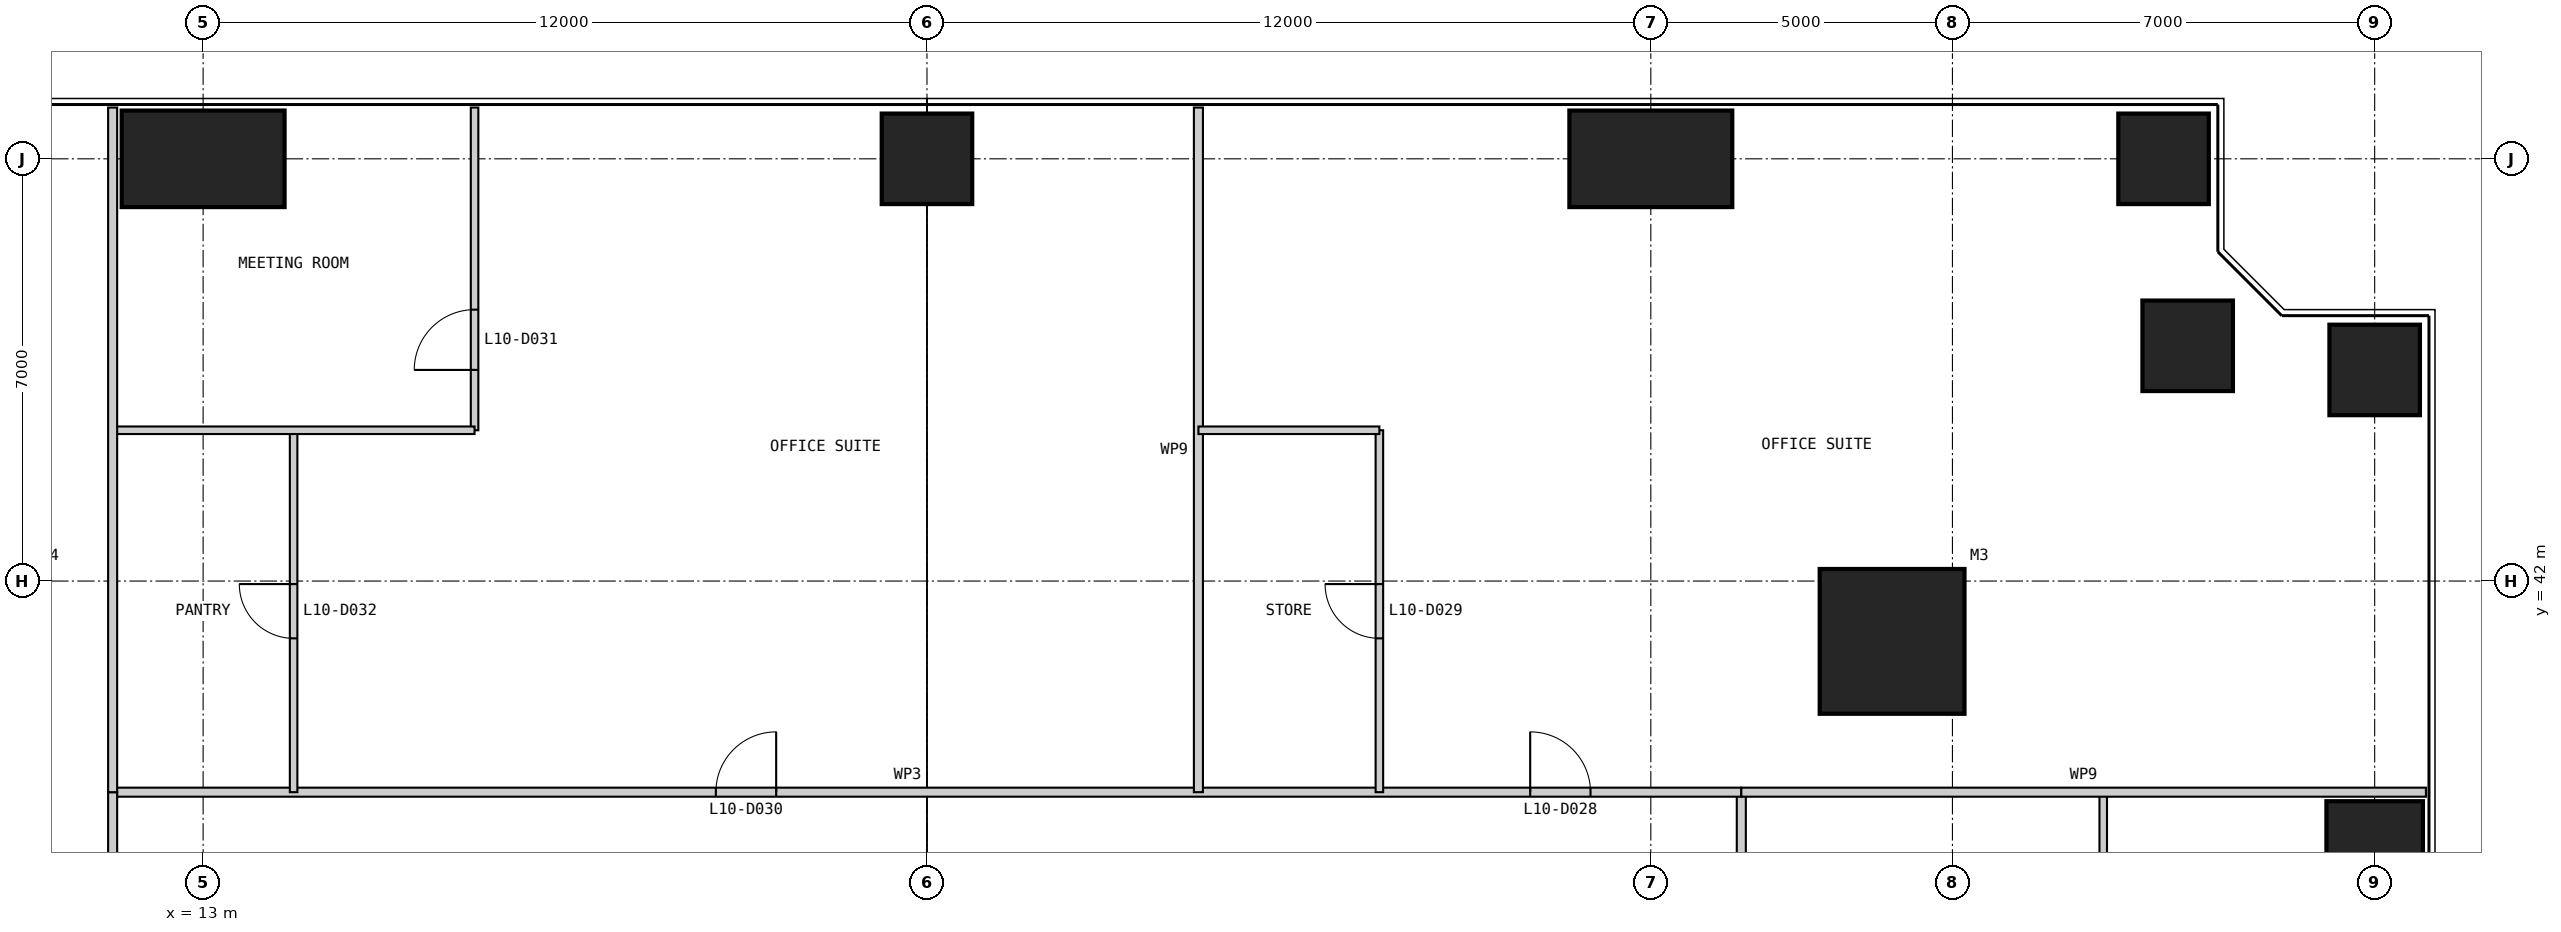
"""IFC4 building model, lengths in metres.
Left out: names, types, materials, properties, quantities, classifications, styles, units other than length and angle.
Written with IfcOpenShell. Run it as: python <this file> out.ifc"""

import sys

from ifc_helpers import new_model, si_unit, direction, frame, frame_2d, origin, origin_2d, place, context, subcontext, project, spatial, rectangle, extrude, element, fill, save


model = new_model("IFC4")
c1 = context("Model", 3, precision=1e-05, world=origin(), true_north=direction((0.0, 1.0)))
c2 = subcontext(c1, "Body", "Model", "MODEL_VIEW")
j1 = project(units=[si_unit("LENGTHUNIT", "METRE"), si_unit("PLANEANGLEUNIT", "RADIAN")], contexts=[c1])
p1 = place(None, origin())
s1 = spatial("IfcSite", under=j1, at=p1, CompositionType="ELEMENT")
p2 = place(p1, origin())
s2 = spatial("IfcBuilding", under=s1, at=p2, CompositionType="ELEMENT")
p3 = place(p2, frame((0.0, 0.0, 47.0)))
s3 = spatial("IfcBuildingStorey", under=s2, at=p3, CompositionType="ELEMENT", Elevation=47.0)
p4 = place(p3, frame((41.0, 41.0, 0.0), z_axis=(0.0, 0.0, 1.0), x_axis=(1.0, 0.0, 0.0)))
e1 = element("IfcColumn", 1, at=p4, inside=s3, PredefinedType="COLUMN", context=c2, shape_type="SweptSolid", body=[
    extrude(rectangle(XDim=2.4, YDim=2.4, at=origin_2d()), origin(), (0.0, 0.0, 1.0), 4.0),
])
p5 = place(p3, frame((49.0, 37.0, 0.0), z_axis=(0.0, 0.0, 1.0), x_axis=(1.0, 0.0, 0.0)))
e2 = element("IfcColumn", 2, at=p5, inside=s3, PredefinedType="COLUMN", context=c2, shape_type="SweptSolid", body=[
    extrude(rectangle(XDim=1.6, YDim=2.7, at=origin_2d()), origin(), (0.0, 0.0, 1.0), 4.0),
])
for number, where, z_axis, x_axis in (
    (3, (49.0, 45.5, 0.0), (0.0, 0.0, 1.0), (1.0, 0.0, 0.0)),
    (4, (45.9, 45.9, 0.0), (0.0, 0.0, 1.0), (1.0, 0.0, 0.0)),
    (5, (45.5, 49.0, 0.0), (0.0, 0.0, 1.0), (1.0, 0.0, 0.0)),
):
    element("IfcColumn", number, at=place(p3, frame(where, z_axis=z_axis, x_axis=x_axis)), inside=s3, PredefinedType="COLUMN", context=c2, shape_type="SweptSolid", body=[
        extrude(rectangle(XDim=1.5, YDim=1.5, at=origin_2d()), origin(), (0.0, 0.0, 1.0), 4.0),
    ])
p6 = place(p3, frame((37.0, 49.0, 0.0), z_axis=(0.0, 0.0, 1.0), x_axis=(1.0, 0.0, 0.0)))
e6 = element("IfcColumn", 6, at=p6, inside=s3, PredefinedType="COLUMN", context=c2, shape_type="SweptSolid", body=[
    extrude(rectangle(XDim=2.7, YDim=1.6, at=origin_2d()), origin(), (0.0, 0.0, 1.0), 4.0),
])
p7 = place(p3, frame((25.0, 49.0, 0.0), z_axis=(0.0, 0.0, 1.0), x_axis=(1.0, 0.0, 0.0)))
e7 = element("IfcColumn", 7, at=p7, inside=s3, PredefinedType="COLUMN", context=c2, shape_type="SweptSolid", body=[
    extrude(rectangle(XDim=1.5, YDim=1.5, at=origin_2d()), origin(), (0.0, 0.0, 1.0), 4.0),
])
p8 = place(p3, frame((13.0, 49.0, 0.0), z_axis=(0.0, 0.0, 1.0), x_axis=(1.0, 0.0, 0.0)))
e8 = element("IfcColumn", 8, at=p8, inside=s3, PredefinedType="COLUMN", context=c2, shape_type="SweptSolid", body=[
    extrude(rectangle(XDim=2.7, YDim=1.6, at=origin_2d()), origin(), (0.0, 0.0, 1.0), 4.0),
])
p9 = place(p3, frame((38.5, 11.5, 0.0), z_axis=(0.0, 0.0, 1.0), x_axis=(0.0, 1.0, 0.0)))
e9 = element("IfcWall", 9, at=p9, inside=s3, PredefinedType="PARTITIONING", context=c2, shape_type="SweptSolid", body=[
    extrude(rectangle(XDim=27.0, YDim=0.15, at=frame_2d((13.5, 0.0))), origin(), (0.0, 0.0, 1.0), 3.85),
])
p10 = place(p9, frame((2.5, 0.0, 0.0)))
e10 = element("IfcOpeningElement", 10, at=p10, cuts=e9, PredefinedType="OPENING", context=c2, shape_type="SweptSolid", body=[
    extrude(rectangle(XDim=1.0, YDim=2.2, at=frame_2d((0.5, 1.1))), frame((0.0, 0.085, 0.0), z_axis=(0.0, -1.0, 0.0), x_axis=(1.0, 0.0, 0.0)), (0.0, 0.0, 1.0), 0.17),
])
p11 = place(p9, frame((16.0, 0.0, 0.0)))
e11 = element("IfcOpeningElement", 11, at=p11, cuts=e9, PredefinedType="OPENING", context=c2, shape_type="SweptSolid", body=[
    extrude(rectangle(XDim=1.0, YDim=2.2, at=frame_2d((0.5, 1.1))), frame((0.0, 0.085, 0.0), z_axis=(0.0, -1.0, 0.0), x_axis=(1.0, 0.0, 0.0)), (0.0, 0.0, 1.0), 0.17),
])
p12 = place(p3, frame((44.5, 32.5, 0.0), z_axis=(0.0, 0.0, 1.0), x_axis=(0.0, 1.0, 0.0)))
e12 = element("IfcWall", 12, at=p12, inside=s3, PredefinedType="PARTITIONING", context=c2, shape_type="SweptSolid", body=[
    extrude(rectangle(XDim=6.0, YDim=0.125, at=frame_2d((3.0, 0.0))), origin(), (0.0, 0.0, 1.0), 3.85),
])
p13 = place(p3, frame((38.5, 38.5, 0.0), z_axis=(0.0, 0.0, 1.0), x_axis=(-1.0, 0.0, 0.0)))
e13 = element("IfcWall", 13, at=p13, inside=s3, PredefinedType="PARTITIONING", context=c2, shape_type="SweptSolid", body=[
    extrude(rectangle(XDim=27.0, YDim=0.15, at=frame_2d((13.5, 0.0))), origin(), (0.0, 0.0, 1.0), 3.85),
])
p14 = place(p13, frame((2.5, 0.0, 0.0)))
e14 = element("IfcOpeningElement", 14, at=p14, cuts=e13, PredefinedType="OPENING", context=c2, shape_type="SweptSolid", body=[
    extrude(rectangle(XDim=1.0, YDim=2.2, at=frame_2d((0.5, 1.1))), frame((0.0, 0.085, 0.0), z_axis=(0.0, -1.0, 0.0), x_axis=(1.0, 0.0, 0.0)), (0.0, 0.0, 1.0), 0.17),
])
p15 = place(p13, frame((16.0, 0.0, 0.0)))
e15 = element("IfcOpeningElement", 15, at=p15, cuts=e13, PredefinedType="OPENING", context=c2, shape_type="SweptSolid", body=[
    extrude(rectangle(XDim=1.0, YDim=2.2, at=frame_2d((0.5, 1.1))), frame((0.0, 0.085, 0.0), z_axis=(0.0, -1.0, 0.0), x_axis=(1.0, 0.0, 0.0)), (0.0, 0.0, 1.0), 0.17),
])
p16 = place(p3, frame((49.85, 38.5, 0.0), z_axis=(0.0, 0.0, 1.0), x_axis=(-1.0, 0.0, 0.0)))
e16 = element("IfcWall", 16, at=p16, inside=s3, PredefinedType="PARTITIONING", context=c2, shape_type="SweptSolid", body=[
    extrude(rectangle(XDim=11.35, YDim=0.15, at=frame_2d((5.675, 0.0))), origin(), (0.0, 0.0, 1.0), 3.85),
])
p17 = place(p3, frame((32.5, 44.5, 0.0), z_axis=(0.0, 0.0, 1.0), x_axis=(0.0, -1.0, 0.0)))
e17 = element("IfcWall", 17, at=p17, inside=s3, PredefinedType="PARTITIONING", context=c2, shape_type="SweptSolid", body=[
    extrude(rectangle(XDim=6.0, YDim=0.125, at=frame_2d((3.0, 0.0))), origin(), (0.0, 0.0, 1.0), 3.85),
])
p18 = place(p17, frame((2.55, 0.0, 0.0)))
e18 = element("IfcOpeningElement", 18, at=p18, cuts=e17, PredefinedType="OPENING", context=c2, shape_type="SweptSolid", body=[
    extrude(rectangle(XDim=0.9, YDim=2.2, at=frame_2d((0.45, 1.1))), frame((0.0, 0.073, 0.0), z_axis=(0.0, -1.0, 0.0), x_axis=(1.0, 0.0, 0.0)), (0.0, 0.0, 1.0), 0.145),
])
p19 = place(p3, frame((29.5, 49.85, 0.0), z_axis=(0.0, 0.0, 1.0), x_axis=(0.0, -1.0, 0.0)))
e19 = element("IfcWall", 19, at=p19, inside=s3, PredefinedType="PARTITIONING", context=c2, shape_type="SweptSolid", body=[
    extrude(rectangle(XDim=11.35, YDim=0.15, at=frame_2d((5.675, 0.0))), origin(), (0.0, 0.0, 1.0), 3.85),
])
p20 = place(p3, frame((17.5, 49.85, 0.0), z_axis=(0.0, 0.0, 1.0), x_axis=(0.0, -1.0, 0.0)))
e20 = element("IfcWall", 20, at=p20, inside=s3, PredefinedType="PARTITIONING", context=c2, shape_type="SweptSolid", body=[
    extrude(rectangle(XDim=5.35, YDim=0.125, at=frame_2d((2.675, 0.0))), origin(), (0.0, 0.0, 1.0), 3.85),
])
p21 = place(p20, frame((3.35, 0.0, 0.0)))
e21 = element("IfcOpeningElement", 21, at=p21, cuts=e20, PredefinedType="OPENING", context=c2, shape_type="SweptSolid", body=[
    extrude(rectangle(XDim=1.0, YDim=2.2, at=frame_2d((0.5, 1.1))), frame((0.0, 0.073, 0.0), z_axis=(0.0, -1.0, 0.0), x_axis=(1.0, 0.0, 0.0)), (0.0, 0.0, 1.0), 0.145),
])
p22 = place(p3, frame((14.5, 44.5, 0.0), z_axis=(0.0, 0.0, 1.0), x_axis=(0.0, -1.0, 0.0)))
e22 = element("IfcWall", 22, at=p22, inside=s3, PredefinedType="PARTITIONING", context=c2, shape_type="SweptSolid", body=[
    extrude(rectangle(XDim=6.0, YDim=0.125, at=frame_2d((3.0, 0.0))), origin(), (0.0, 0.0, 1.0), 3.85),
])
p23 = place(p22, frame((2.55, 0.0, 0.0)))
e23 = element("IfcOpeningElement", 23, at=p23, cuts=e22, PredefinedType="OPENING", context=c2, shape_type="SweptSolid", body=[
    extrude(rectangle(XDim=0.9, YDim=2.2, at=frame_2d((0.45, 1.1))), frame((0.0, 0.073, 0.0), z_axis=(0.0, -1.0, 0.0), x_axis=(1.0, 0.0, 0.0)), (0.0, 0.0, 1.0), 0.145),
])
p24 = place(p3, frame((32.5, 44.5, 0.0), z_axis=(0.0, 0.0, 1.0), x_axis=(-1.0, 0.0, 0.0)))
e24 = element("IfcWall", 24, at=p24, inside=s3, PredefinedType="PARTITIONING", context=c2, shape_type="SweptSolid", body=[
    extrude(rectangle(XDim=3.0, YDim=0.125, at=frame_2d((1.5, 0.0))), origin(), (0.0, 0.0, 1.0), 3.85),
])
p25 = place(p3, frame((17.5, 44.5, 0.0), z_axis=(0.0, 0.0, 1.0), x_axis=(-1.0, 0.0, 0.0)))
e25 = element("IfcWall", 25, at=p25, inside=s3, PredefinedType="PARTITIONING", context=c2, shape_type="SweptSolid", body=[
    extrude(rectangle(XDim=6.0, YDim=0.125, at=frame_2d((3.0, 0.0))), origin(), (0.0, 0.0, 1.0), 3.85),
])
p26 = place(p3, frame((11.5, 38.5, 0.0), z_axis=(0.0, 0.0, 1.0), x_axis=(0.0, -1.0, 0.0)))
e26 = element("IfcWall", 26, at=p26, inside=s3, PredefinedType="PARTITIONING", context=c2, shape_type="SweptSolid", body=[
    extrude(rectangle(XDim=27.0, YDim=0.15, at=frame_2d((13.5, 0.0))), origin(), (0.0, 0.0, 1.0), 3.85),
])
p27 = place(p26, frame((2.5, 0.0, 0.0)))
e27 = element("IfcOpeningElement", 27, at=p27, cuts=e26, PredefinedType="OPENING", context=c2, shape_type="SweptSolid", body=[
    extrude(rectangle(XDim=1.0, YDim=2.2, at=frame_2d((0.5, 1.1))), frame((0.0, 0.085, 0.0), z_axis=(0.0, -1.0, 0.0), x_axis=(1.0, 0.0, 0.0)), (0.0, 0.0, 1.0), 0.17),
])
p28 = place(p26, frame((13.0, 0.0, 0.0)))
e28 = element("IfcOpeningElement", 28, at=p28, cuts=e26, PredefinedType="OPENING", context=c2, shape_type="SweptSolid", body=[
    extrude(rectangle(XDim=1.0, YDim=2.2, at=frame_2d((0.5, 1.1))), frame((0.0, 0.085, 0.0), z_axis=(0.0, -1.0, 0.0), x_axis=(1.0, 0.0, 0.0)), (0.0, 0.0, 1.0), 0.17),
])
p29 = place(p26, frame((23.5, 0.0, 0.0)))
e29 = element("IfcOpeningElement", 29, at=p29, cuts=e26, PredefinedType="OPENING", context=c2, shape_type="SweptSolid", body=[
    extrude(rectangle(XDim=1.0, YDim=2.2, at=frame_2d((0.5, 1.1))), frame((0.0, 0.085, 0.0), z_axis=(0.0, -1.0, 0.0), x_axis=(1.0, 0.0, 0.0)), (0.0, 0.0, 1.0), 0.17),
])
p30 = place(p3, frame((11.5, 49.85, 0.0), z_axis=(0.0, 0.0, 1.0), x_axis=(0.0, -1.0, 0.0)))
e30 = element("IfcWall", 30, at=p30, inside=s3, PredefinedType="PARTITIONING", context=c2, shape_type="SweptSolid", body=[
    extrude(rectangle(XDim=11.35, YDim=0.15, at=frame_2d((5.675, 0.0))), origin(), (0.0, 0.0, 1.0), 3.85),
])
p31 = place(p14, frame((1.0, 0.0, 0.0), z_axis=(0.0, 0.0, 1.0), x_axis=(-1.0, 0.0, 0.0)))
e31 = element("IfcDoor", 31, at=p31, inside=s3, OperationType="SINGLE_SWING_LEFT", PredefinedType="DOOR", context=c2, shape_type="SweptSolid", body=[
    extrude(rectangle(XDim=1.0, YDim=2.2, at=frame_2d((0.5, 1.1))), frame((0.0, 0.025, 0.0), z_axis=(0.0, -1.0, 0.0), x_axis=(1.0, 0.0, 0.0)), (0.0, 0.0, 1.0), 0.05),
])
fill(e14, e31)
p32 = place(p18, frame((0.9, 0.0, 0.0), z_axis=(0.0, 0.0, 1.0), x_axis=(-1.0, 0.0, 0.0)))
e32 = element("IfcDoor", 32, at=p32, inside=s3, OperationType="SINGLE_SWING_RIGHT", PredefinedType="DOOR", context=c2, shape_type="SweptSolid", body=[
    extrude(rectangle(XDim=0.9, YDim=2.2, at=frame_2d((0.45, 1.1))), frame((0.0, 0.025, 0.0), z_axis=(0.0, -1.0, 0.0), x_axis=(1.0, 0.0, 0.0)), (0.0, 0.0, 1.0), 0.05),
])
fill(e18, e32)
p33 = place(p15, frame((1.0, 0.0, 0.0), z_axis=(0.0, 0.0, 1.0), x_axis=(-1.0, 0.0, 0.0)))
e33 = element("IfcDoor", 33, at=p33, inside=s3, OperationType="SINGLE_SWING_RIGHT", PredefinedType="DOOR", context=c2, shape_type="SweptSolid", body=[
    extrude(rectangle(XDim=1.0, YDim=2.2, at=frame_2d((0.5, 1.1))), frame((0.0, 0.025, 0.0), z_axis=(0.0, -1.0, 0.0), x_axis=(1.0, 0.0, 0.0)), (0.0, 0.0, 1.0), 0.05),
])
fill(e15, e33)
p34 = place(p21, frame((1.0, 0.0, 0.0), z_axis=(0.0, 0.0, 1.0), x_axis=(-1.0, 0.0, 0.0)))
e34 = element("IfcDoor", 34, at=p34, inside=s3, OperationType="SINGLE_SWING_LEFT", PredefinedType="DOOR", context=c2, shape_type="SweptSolid", body=[
    extrude(rectangle(XDim=1.0, YDim=2.2, at=frame_2d((0.5, 1.1))), frame((0.0, 0.025, 0.0), z_axis=(0.0, -1.0, 0.0), x_axis=(1.0, 0.0, 0.0)), (0.0, 0.0, 1.0), 0.05),
])
fill(e21, e34)
p35 = place(p23, frame((0.9, 0.0, 0.0), z_axis=(0.0, 0.0, 1.0), x_axis=(-1.0, 0.0, 0.0)))
e35 = element("IfcDoor", 35, at=p35, inside=s3, OperationType="SINGLE_SWING_RIGHT", PredefinedType="DOOR", context=c2, shape_type="SweptSolid", body=[
    extrude(rectangle(XDim=0.9, YDim=2.2, at=frame_2d((0.45, 1.1))), frame((0.0, 0.025, 0.0), z_axis=(0.0, -1.0, 0.0), x_axis=(1.0, 0.0, 0.0)), (0.0, 0.0, 1.0), 0.05),
])
fill(e23, e35)
save(model, sys.argv[1])
